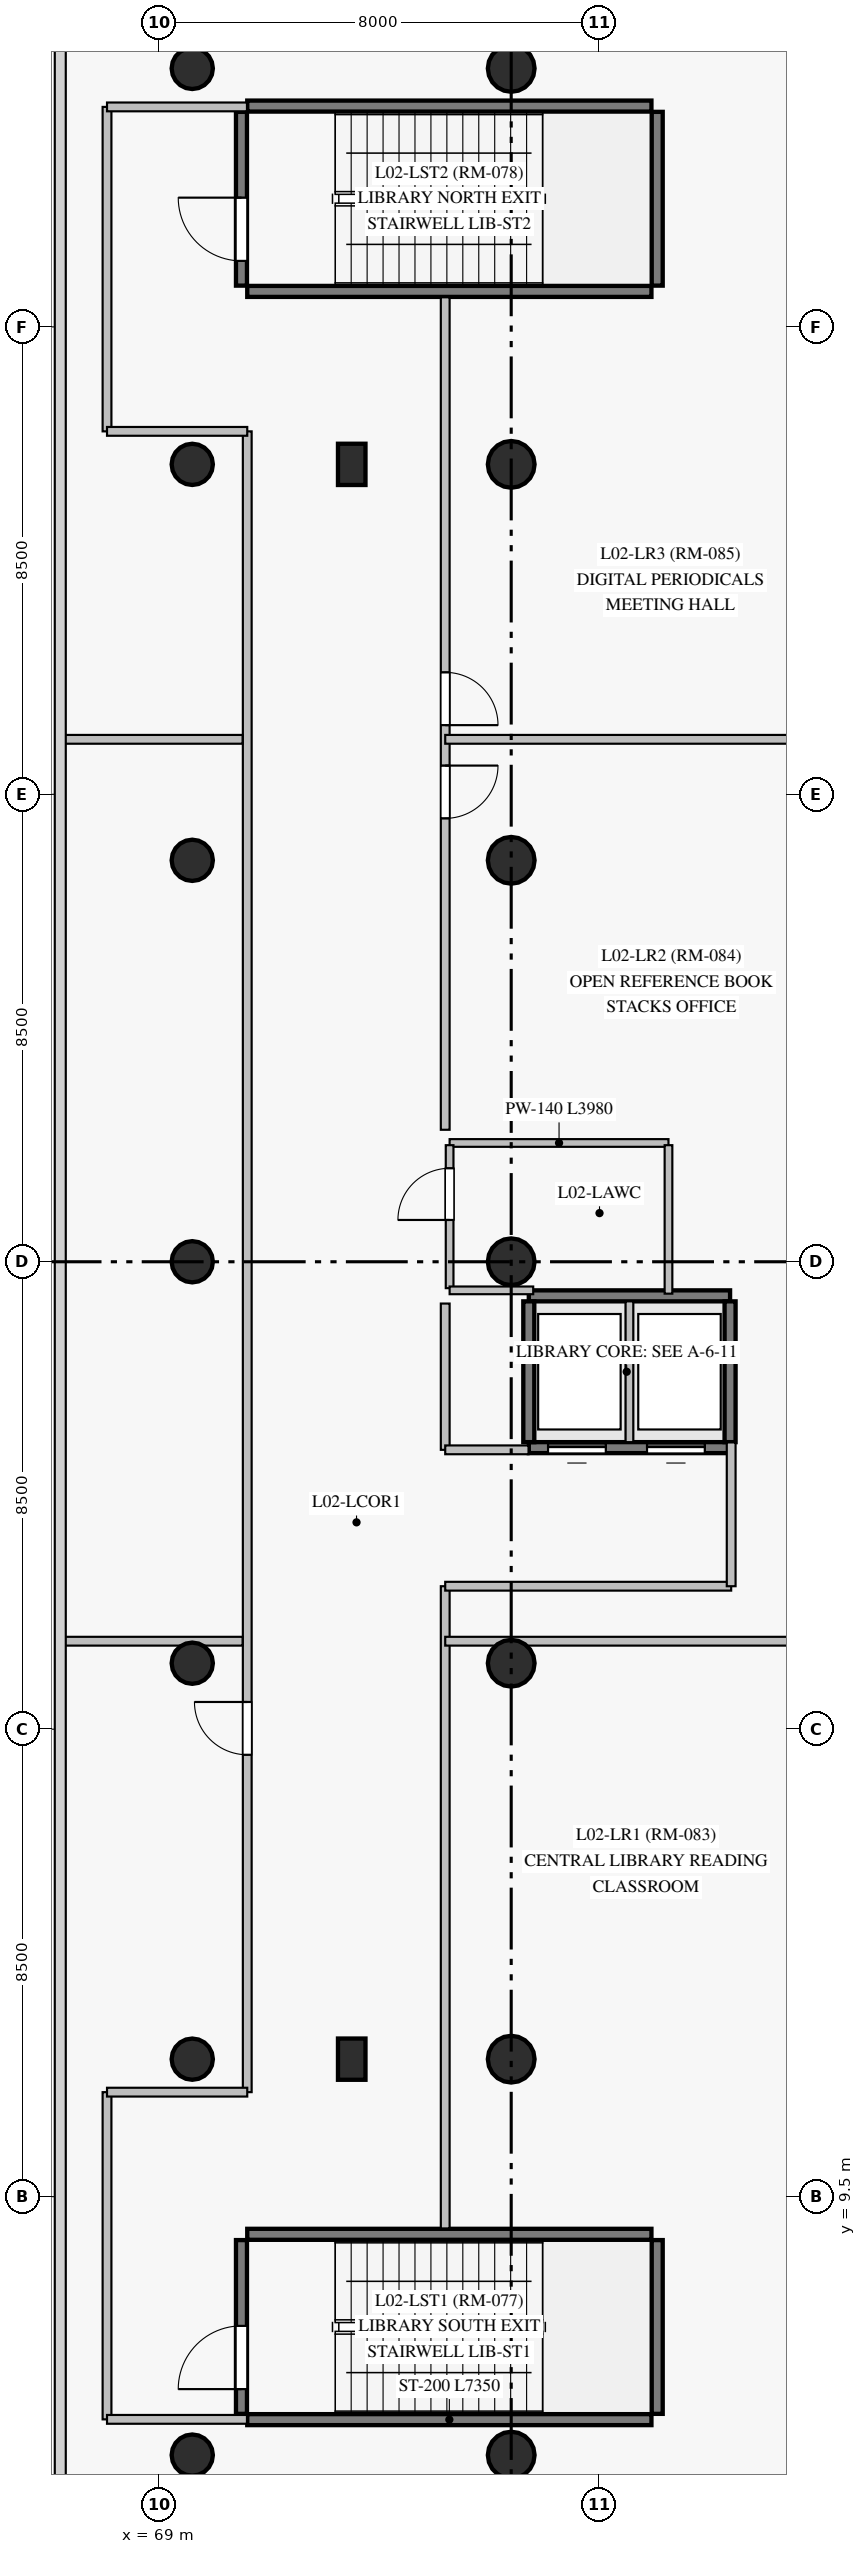
"""IFC4 building model, lengths in metres.
Left out: names, types, materials, properties, quantities, classifications, styles, units other than length and angle.
Written with IfcOpenShell. Run it as: python <this file> out.ifc"""

import sys

from ifc_helpers import new_model, si_unit, direction, frame, frame_2d, origin, origin_with_axes, origin_2d, place, context, subcontext, project, spatial, rectangle, circle, extrude, source, transform, mapped, element, fill, save


model = new_model("IFC4")
c1 = context("Model", 3, precision=1e-05, world=origin(), true_north=direction((0.0, 1.0)))
c2 = subcontext(c1, "Body", "Model", "MODEL_VIEW")
j1 = project(units=[si_unit("LENGTHUNIT", "METRE"), si_unit("PLANEANGLEUNIT", "RADIAN")], contexts=[c1])
p1 = place(None, origin())
s1 = spatial("IfcSite", under=j1, at=p1, CompositionType="ELEMENT")
p2 = place(p1, origin())
s2 = spatial("IfcBuilding", under=s1, at=p2, CompositionType="ELEMENT")
p3 = place(p2, frame((0.0, 0.0, 9.0)))
s3 = spatial("IfcBuildingStorey", under=s2, at=p3, CompositionType="ELEMENT", Elevation=9.0)
m1 = source(origin_with_axes(), c2, "Body", "SweptSolid", [
    extrude(circle(Radius=0.375, at=origin_2d()), origin(), (0.0, 0.0, 1.0), 4.5),
])
for number, where, z_axis, x_axis in (
    (1, (69.6, 4.8, 0.0), (0.0, 0.0, 1.0), (1.0, 0.0, 0.0)),
    (2, (69.6, 12.0, 0.0), (0.0, 0.0, 1.0), (1.0, 0.0, 0.0)),
    (3, (69.6, 19.2, 0.0), (0.0, 0.0, 1.0), (1.0, 0.0, 0.0)),
    (4, (69.6, 26.5, 0.0), (0.0, 0.0, 1.0), (1.0, 0.0, 0.0)),
    (5, (69.6, 33.8, 0.0), (0.0, 0.0, 1.0), (1.0, 0.0, 0.0)),
    (6, (69.6, 41.0, 0.0), (0.0, 0.0, 1.0), (1.0, 0.0, 0.0)),
    (7, (69.6, 48.2, 0.0), (0.0, 0.0, 1.0), (1.0, 0.0, 0.0)),
):
    element("IfcColumn", number, at=place(p3, frame(where, z_axis=z_axis, x_axis=x_axis)), inside=s3, PredefinedType="COLUMN", context=c2, shape_type="MappedRepresentation", body=[
        mapped(m1, transform((0.0, 0.0, 0.0), scale=1.0)),
    ])
m2 = source(origin_with_axes(), c2, "Body", "SweptSolid", [
    extrude(circle(Radius=0.425, at=origin_2d()), origin(), (0.0, 0.0, 1.0), 4.5),
])
for number, where, z_axis, x_axis in (
    (8, (75.4, 4.8, 0.0), (0.0, 0.0, 1.0), (1.0, 0.0, 0.0)),
    (9, (75.4, 12.0, 0.0), (0.0, 0.0, 1.0), (1.0, 0.0, 0.0)),
    (10, (75.4, 19.2, 0.0), (0.0, 0.0, 1.0), (1.0, 0.0, 0.0)),
    (11, (75.4, 26.5, 0.0), (0.0, 0.0, 1.0), (1.0, 0.0, 0.0)),
    (12, (75.4, 33.8, 0.0), (0.0, 0.0, 1.0), (1.0, 0.0, 0.0)),
    (13, (75.4, 41.0, 0.0), (0.0, 0.0, 1.0), (1.0, 0.0, 0.0)),
    (14, (75.4, 48.2, 0.0), (0.0, 0.0, 1.0), (1.0, 0.0, 0.0)),
):
    element("IfcColumn", number, at=place(p3, frame(where, z_axis=z_axis, x_axis=x_axis)), inside=s3, PredefinedType="COLUMN", context=c2, shape_type="MappedRepresentation", body=[
        mapped(m2, transform((0.0, 0.0, 0.0), scale=1.0)),
    ])
m3 = source(origin_with_axes(), c2, "Body", "SweptSolid", [
    extrude(rectangle(XDim=0.5, YDim=0.75, at=origin_2d()), origin(), (0.0, 0.0, 1.0), 4.5),
])
for number, where, z_axis, x_axis in (
    (15, (72.5, 12.0, 0.0), (0.0, 0.0, 1.0), (1.0, 0.0, 0.0)),
    (16, (72.5, 41.0, 0.0), (0.0, 0.0, 1.0), (1.0, 0.0, 0.0)),
):
    element("IfcColumn", number, at=place(p3, frame(where, z_axis=z_axis, x_axis=x_axis)), inside=s3, PredefinedType="PILASTER", context=c2, shape_type="MappedRepresentation", body=[
        mapped(m3, transform((0.0, 0.0, 0.0), scale=1.0)),
    ])
for number, where, z_axis, x_axis in (
    (17, (70.6, 5.445, 0.0), (0.0, 0.0, 1.0), (1.0, 0.0, 0.0)),
    (18, (70.6, 8.815, 0.0), (0.0, 0.0, 1.0), (1.0, 0.0, 0.0)),
    (19, (70.6, 44.145, 0.0), (0.0, 0.0, 1.0), (1.0, 0.0, 0.0)),
    (20, (70.6, 47.515, 0.0), (0.0, 0.0, 1.0), (1.0, 0.0, 0.0)),
):
    element("IfcWall", number, at=place(p3, frame(where, z_axis=z_axis, x_axis=x_axis)), inside=s3, PredefinedType="SHEAR", context=c2, shape_type="SweptSolid", body=[
        extrude(rectangle(XDim=7.35, YDim=0.2, at=frame_2d((3.675, 0.0))), origin(), (0.0, 0.0, 1.0), 4.2),
    ])
p4 = place(p3, frame((75.72, 23.12, 0.0), z_axis=(0.0, 0.0, 1.0), x_axis=(1.0, 0.0, 0.0)))
e21 = element("IfcWall", 21, at=p4, inside=s3, PredefinedType="SHEAR", context=c2, shape_type="SweptSolid", body=[
    extrude(rectangle(XDim=3.66, YDim=0.2, at=frame_2d((1.83, 0.0))), origin(), (0.0, 0.0, 1.0), 4.2),
])
p5 = place(p4, frame((0.35, 0.0, 0.0)))
e22 = element("IfcOpeningElement", 22, at=p5, cuts=e21, PredefinedType="OPENING", context=c2, shape_type="SweptSolid", body=[
    extrude(rectangle(XDim=1.05, YDim=2.15, at=frame_2d((0.525, 1.075))), frame((0.0, 0.11, 0.0), z_axis=(0.0, -1.0, 0.0), x_axis=(1.0, 0.0, 0.0)), (0.0, 0.0, 1.0), 0.22),
])
p6 = place(p4, frame((2.15, 0.0, 0.0)))
e23 = element("IfcOpeningElement", 23, at=p6, cuts=e21, PredefinedType="OPENING", context=c2, shape_type="SweptSolid", body=[
    extrude(rectangle(XDim=1.05, YDim=2.15, at=frame_2d((0.525, 1.075))), frame((0.0, 0.11, 0.0), z_axis=(0.0, -1.0, 0.0), x_axis=(1.0, 0.0, 0.0)), (0.0, 0.0, 1.0), 0.22),
])
p7 = place(p3, frame((75.72, 25.88, 0.0), z_axis=(0.0, 0.0, 1.0), x_axis=(1.0, 0.0, 0.0)))
e24 = element("IfcWall", 24, at=p7, inside=s3, PredefinedType="SHEAR", context=c2, shape_type="SweptSolid", body=[
    extrude(rectangle(XDim=3.66, YDim=0.2, at=frame_2d((1.83, 0.0))), origin(), (0.0, 0.0, 1.0), 4.2),
])
p8 = place(p3, frame((70.495, 5.55, 0.0), z_axis=(0.0, 0.0, 1.0), x_axis=(0.0, 1.0, 0.0)))
e25 = element("IfcWall", 25, at=p8, inside=s3, PredefinedType="SHEAR", context=c2, shape_type="SweptSolid", body=[
    extrude(rectangle(XDim=3.16, YDim=0.2, at=frame_2d((1.58, 0.0))), origin(), (0.0, 0.0, 1.0), 4.2),
])
p9 = place(p8, frame((0.45, 0.0, 0.0)))
e26 = element("IfcOpeningElement", 26, at=p9, cuts=e25, PredefinedType="OPENING", context=c2, shape_type="SweptSolid", body=[
    extrude(rectangle(XDim=1.15, YDim=2.15, at=frame_2d((0.575, 1.075))), frame((0.0, 0.11, 0.0), z_axis=(0.0, -1.0, 0.0), x_axis=(1.0, 0.0, 0.0)), (0.0, 0.0, 1.0), 0.22),
])
p10 = place(p3, frame((78.055, 5.55, 0.0), z_axis=(0.0, 0.0, 1.0), x_axis=(0.0, 1.0, 0.0)))
e27 = element("IfcWall", 27, at=p10, inside=s3, PredefinedType="SHEAR", context=c2, shape_type="SweptSolid", body=[
    extrude(rectangle(XDim=3.16, YDim=0.2, at=frame_2d((1.58, 0.0))), origin(), (0.0, 0.0, 1.0), 4.2),
])
p11 = place(p3, frame((70.495, 44.25, 0.0), z_axis=(0.0, 0.0, 1.0), x_axis=(0.0, 1.0, 0.0)))
e28 = element("IfcWall", 28, at=p11, inside=s3, PredefinedType="SHEAR", context=c2, shape_type="SweptSolid", body=[
    extrude(rectangle(XDim=3.16, YDim=0.2, at=frame_2d((1.58, 0.0))), origin(), (0.0, 0.0, 1.0), 4.2),
])
p12 = place(p11, frame((0.45, 0.0, 0.0)))
e29 = element("IfcOpeningElement", 29, at=p12, cuts=e28, PredefinedType="OPENING", context=c2, shape_type="SweptSolid", body=[
    extrude(rectangle(XDim=1.15, YDim=2.15, at=frame_2d((0.575, 1.075))), frame((0.0, 0.11, 0.0), z_axis=(0.0, -1.0, 0.0), x_axis=(1.0, 0.0, 0.0)), (0.0, 0.0, 1.0), 0.22),
])
p13 = place(p3, frame((78.055, 44.25, 0.0), z_axis=(0.0, 0.0, 1.0), x_axis=(0.0, 1.0, 0.0)))
e30 = element("IfcWall", 30, at=p13, inside=s3, PredefinedType="SHEAR", context=c2, shape_type="SweptSolid", body=[
    extrude(rectangle(XDim=3.16, YDim=0.2, at=frame_2d((1.58, 0.0))), origin(), (0.0, 0.0, 1.0), 4.2),
])
for number, where, z_axis, x_axis in (
    (31, (75.72, 23.22, 0.0), (0.0, 0.0, 1.0), (0.0, 1.0, 0.0)),
    (32, (79.38, 23.22, 0.0), (0.0, 0.0, 1.0), (0.0, 1.0, 0.0)),
):
    element("IfcWall", number, at=place(p3, frame(where, z_axis=z_axis, x_axis=x_axis)), inside=s3, PredefinedType="SHEAR", context=c2, shape_type="SweptSolid", body=[
        extrude(rectangle(XDim=2.56, YDim=0.2, at=frame_2d((1.28, 0.0))), origin(), (0.0, 0.0, 1.0), 4.2),
    ])
p14 = place(p3, frame((70.6, 11.4, 0.0), z_axis=(0.0, 0.0, 1.0), x_axis=(0.0, 1.0, 0.0)))
e33 = element("IfcWall", 33, at=p14, inside=s3, PredefinedType="PARTITIONING", context=c2, shape_type="SweptSolid", body=[
    extrude(rectangle(XDim=30.2, YDim=0.16, at=frame_2d((15.1, 0.0))), origin(), (0.0, 0.0, 1.0), 4.2),
])
p15 = place(p14, frame((6.135, 0.0, 0.0)))
e34 = element("IfcOpeningElement", 34, at=p15, cuts=e33, PredefinedType="OPENING", context=c2, shape_type="SweptSolid", body=[
    extrude(rectangle(XDim=0.96, YDim=2.15, at=frame_2d((0.48, 1.075))), frame((0.0, 0.09, 0.0), z_axis=(0.0, -1.0, 0.0), x_axis=(1.0, 0.0, 0.0)), (0.0, 0.0, 1.0), 0.18),
])
p16 = place(p3, frame((74.2, 44.038, 0.0), z_axis=(0.0, 0.0, 1.0), x_axis=(0.0, -1.0, 0.0)))
e35 = element("IfcWall", 35, at=p16, inside=s3, PredefinedType="PARTITIONING", context=c2, shape_type="SweptSolid", body=[
    extrude(rectangle(XDim=15.138, YDim=0.16, at=frame_2d((7.569, 0.0))), origin(), (0.0, 0.0, 1.0), 4.2),
])
p17 = place(p16, frame((8.515, 0.0, 0.0)))
e36 = element("IfcOpeningElement", 36, at=p17, cuts=e35, PredefinedType="OPENING", context=c2, shape_type="SweptSolid", body=[
    extrude(rectangle(XDim=0.96, YDim=2.15, at=frame_2d((0.48, 1.075))), frame((0.0, 0.09, 0.0), z_axis=(0.0, -1.0, 0.0), x_axis=(1.0, 0.0, 0.0)), (0.0, 0.0, 1.0), 0.18),
])
p18 = place(p16, frame((6.82, 0.0, 0.0)))
e37 = element("IfcOpeningElement", 37, at=p18, cuts=e35, PredefinedType="OPENING", context=c2, shape_type="SweptSolid", body=[
    extrude(rectangle(XDim=0.96, YDim=2.15, at=frame_2d((0.48, 1.075))), frame((0.0, 0.09, 0.0), z_axis=(0.0, -1.0, 0.0), x_axis=(1.0, 0.0, 0.0)), (0.0, 0.0, 1.0), 0.18),
])
p19 = place(p3, frame((74.2, 20.6, 0.0), z_axis=(0.0, 0.0, 1.0), x_axis=(0.0, -1.0, 0.0)))
e38 = element("IfcWall", 38, at=p19, inside=s3, PredefinedType="PARTITIONING", context=c2, shape_type="SweptSolid", body=[
    extrude(rectangle(XDim=11.678, YDim=0.16, at=frame_2d((5.839, 0.0))), origin(), (0.0, 0.0, 1.0), 4.2),
])
p20 = place(p3, frame((74.2, 19.6, 0.0), z_axis=(0.0, 0.0, 1.0), x_axis=(1.0, 0.0, 0.0)))
e39 = element("IfcWall", 39, at=p20, inside=s3, PredefinedType="PARTITIONING", context=c2, shape_type="SweptSolid", body=[
    extrude(rectangle(XDim=7.545, YDim=0.16, at=frame_2d((3.772, 0.0))), origin(), (0.0, 0.0, 1.0), 3.55),
])
p21 = place(p3, frame((74.2, 36.0, 0.0), z_axis=(0.0, 0.0, 1.0), x_axis=(1.0, 0.0, 0.0)))
e40 = element("IfcWall", 40, at=p21, inside=s3, PredefinedType="PARTITIONING", context=c2, shape_type="SweptSolid", body=[
    extrude(rectangle(XDim=7.545, YDim=0.16, at=frame_2d((3.772, 0.0))), origin(), (0.0, 0.0, 1.0), 4.2),
])
p22 = place(p3, frame((68.05, 5.45, 0.0), z_axis=(0.0, 0.0, 1.0), x_axis=(0.0, 1.0, 0.0)))
e41 = element("IfcWall", 41, at=p22, inside=s3, PredefinedType="PARTITIONING", context=c2, shape_type="SweptSolid", body=[
    extrude(rectangle(XDim=5.95, YDim=0.16, at=frame_2d((2.975, 0.0))), origin(), (0.0, 0.0, 1.0), 4.2),
])
p23 = place(p3, frame((68.05, 41.6, 0.0), z_axis=(0.0, 0.0, 1.0), x_axis=(0.0, 1.0, 0.0)))
e42 = element("IfcWall", 42, at=p23, inside=s3, PredefinedType="PARTITIONING", context=c2, shape_type="SweptSolid", body=[
    extrude(rectangle(XDim=5.9, YDim=0.16, at=frame_2d((2.95, 0.0))), origin(), (0.0, 0.0, 1.0), 4.2),
])
p24 = place(p3, frame((79.4, 20.6, 0.0), z_axis=(0.0, 0.0, 1.0), x_axis=(-1.0, 0.0, 0.0)))
e43 = element("IfcWall", 43, at=p24, inside=s3, PredefinedType="PARTITIONING", context=c2, shape_type="SweptSolid", body=[
    extrude(rectangle(XDim=5.2, YDim=0.16, at=frame_2d((2.6, 0.0))), origin(), (0.0, 0.0, 1.0), 4.2),
])
p25 = place(p3, frame((74.28, 28.66, 0.0), z_axis=(0.0, 0.0, 1.0), x_axis=(1.0, 0.0, 0.0)))
e44 = element("IfcWall", 44, at=p25, inside=s3, PredefinedType="PARTITIONING", context=c2, shape_type="SweptSolid", body=[
    extrude(rectangle(XDim=3.98, YDim=0.14, at=frame_2d((1.99, 0.0))), origin(), (0.0, 0.0, 1.0), 4.2),
])
p26 = place(p3, frame((67.255, 19.6, 0.0), z_axis=(0.0, 0.0, 1.0), x_axis=(1.0, 0.0, 0.0)))
e45 = element("IfcWall", 45, at=p26, inside=s3, PredefinedType="PARTITIONING", context=c2, shape_type="SweptSolid", body=[
    extrude(rectangle(XDim=3.26, YDim=0.16, at=frame_2d((1.63, 0.0))), origin(), (0.0, 0.0, 1.0), 3.55),
])
p27 = place(p3, frame((67.255, 36.0, 0.0), z_axis=(0.0, 0.0, 1.0), x_axis=(1.0, 0.0, 0.0)))
e46 = element("IfcWall", 46, at=p27, inside=s3, PredefinedType="PARTITIONING", context=c2, shape_type="SweptSolid", body=[
    extrude(rectangle(XDim=3.26, YDim=0.16, at=frame_2d((1.63, 0.0))), origin(), (0.0, 0.0, 1.0), 4.2),
])
p28 = place(p3, frame((78.26, 25.92, 0.0), z_axis=(0.0, 0.0, 1.0), x_axis=(0.0, 1.0, 0.0)))
e47 = element("IfcWall", 47, at=p28, inside=s3, PredefinedType="PARTITIONING", context=c2, shape_type="SweptSolid", body=[
    extrude(rectangle(XDim=2.7, YDim=0.14, at=frame_2d((1.35, 0.0))), origin(), (0.0, 0.0, 1.0), 4.2),
])
p29 = place(p3, frame((74.2, 25.74, 0.0), z_axis=(0.0, 0.0, 1.0), x_axis=(0.0, -1.0, 0.0)))
e48 = element("IfcWall", 48, at=p29, inside=s3, PredefinedType="PARTITIONING", context=c2, shape_type="SweptSolid", body=[
    extrude(rectangle(XDim=2.66, YDim=0.16, at=frame_2d((1.33, 0.0))), origin(), (0.0, 0.0, 1.0), 4.2),
])
p30 = place(p3, frame((74.28, 26.02, 0.0), z_axis=(0.0, 0.0, 1.0), x_axis=(0.0, 1.0, 0.0)))
e49 = element("IfcWall", 49, at=p30, inside=s3, PredefinedType="PARTITIONING", context=c2, shape_type="SweptSolid", body=[
    extrude(rectangle(XDim=2.6, YDim=0.14, at=frame_2d((1.3, 0.0))), origin(), (0.0, 0.0, 1.0), 4.2),
])
p31 = place(p30, frame((1.24, 0.0, 0.0)))
e50 = element("IfcOpeningElement", 50, at=p31, cuts=e49, PredefinedType="OPENING", context=c2, shape_type="SweptSolid", body=[
    extrude(rectangle(XDim=0.94, YDim=2.1, at=frame_2d((0.47, 1.05))), frame((0.0, 0.08, 0.0), z_axis=(0.0, -1.0, 0.0), x_axis=(1.0, 0.0, 0.0)), (0.0, 0.0, 1.0), 0.16),
])
p32 = place(p3, frame((77.55, 23.22, 0.0), z_axis=(0.0, 0.0, 1.0), x_axis=(0.0, 1.0, 0.0)))
e51 = element("IfcWall", 51, at=p32, inside=s3, PredefinedType="PARTITIONING", context=c2, shape_type="SweptSolid", body=[
    extrude(rectangle(XDim=2.56, YDim=0.14, at=frame_2d((1.28, 0.0))), origin(), (0.0, 0.0, 1.0), 4.2),
])
for number, where, z_axis, x_axis in (
    (52, (70.6, 41.6, 0.0), (0.0, 0.0, 1.0), (-1.0, 0.0, 0.0)),
    (53, (68.05, 11.4, 0.0), (0.0, 0.0, 1.0), (1.0, 0.0, 0.0)),
):
    element("IfcWall", number, at=place(p3, frame(where, z_axis=z_axis, x_axis=x_axis)), inside=s3, PredefinedType="PARTITIONING", context=c2, shape_type="SweptSolid", body=[
        extrude(rectangle(XDim=2.55, YDim=0.16, at=frame_2d((1.275, 0.0))), origin(), (0.0, 0.0, 1.0), 3.55),
    ])
p33 = place(p3, frame((79.4, 23.215, 0.0), z_axis=(0.0, 0.0, 1.0), x_axis=(0.0, -1.0, 0.0)))
e54 = element("IfcWall", 54, at=p33, inside=s3, PredefinedType="PARTITIONING", context=c2, shape_type="SweptSolid", body=[
    extrude(rectangle(XDim=2.615, YDim=0.16, at=frame_2d((1.308, 0.0))), origin(), (0.0, 0.0, 1.0), 4.2),
])
p34 = place(p3, frame((68.05, 47.5, 0.0), z_axis=(0.0, 0.0, 1.0), x_axis=(1.0, 0.0, 0.0)))
e55 = element("IfcWall", 55, at=p34, inside=s3, PredefinedType="PARTITIONING", context=c2, shape_type="SweptSolid", body=[
    extrude(rectangle(XDim=2.545, YDim=0.16, at=frame_2d((1.272, 0.0))), origin(), (0.0, 0.0, 1.0), 4.2),
])
p35 = place(p3, frame((70.595, 5.45, 0.0), z_axis=(0.0, 0.0, 1.0), x_axis=(-1.0, 0.0, 0.0)))
e56 = element("IfcWall", 56, at=p35, inside=s3, PredefinedType="PARTITIONING", context=c2, shape_type="SweptSolid", body=[
    extrude(rectangle(XDim=2.545, YDim=0.16, at=frame_2d((1.272, 0.0))), origin(), (0.0, 0.0, 1.0), 3.55),
])
p36 = place(p3, frame((74.28, 25.98, 0.0), z_axis=(0.0, 0.0, 1.0), x_axis=(1.0, 0.0, 0.0)))
e57 = element("IfcWall", 57, at=p36, inside=s3, PredefinedType="PARTITIONING", context=c2, shape_type="SweptSolid", body=[
    extrude(rectangle(XDim=1.52, YDim=0.14, at=frame_2d((0.76, 0.0))), origin(), (0.0, 0.0, 1.0), 3.55),
])
p37 = place(p3, frame((74.2, 23.08, 0.0), z_axis=(0.0, 0.0, 1.0), x_axis=(1.0, 0.0, 0.0)))
e58 = element("IfcWall", 58, at=p37, inside=s3, PredefinedType="PARTITIONING", context=c2, shape_type="SweptSolid", body=[
    extrude(rectangle(XDim=1.515, YDim=0.16, at=frame_2d((0.758, 0.0))), origin(), (0.0, 0.0, 1.0), 3.7),
])
m4 = source(origin_with_axes(), c2, "Body", "SweptSolid", [
    extrude(rectangle(XDim=1.15, YDim=2.15, at=frame_2d((0.575, 1.075))), frame((0.0, 0.025, 0.0), z_axis=(0.0, -1.0, 0.0), x_axis=(1.0, 0.0, 0.0)), (0.0, 0.0, 1.0), 0.05),
])
p38 = place(p9, origin())
e59 = element("IfcDoor", 59, at=p38, inside=s3, OperationType="SINGLE_SWING_LEFT", PredefinedType="DOOR", context=c2, shape_type="MappedRepresentation", body=[
    mapped(m4, transform((0.0, 0.0, 0.0), scale=1.0)),
])
fill(e26, e59)
p39 = place(p12, origin())
e60 = element("IfcDoor", 60, at=p39, inside=s3, OperationType="SINGLE_SWING_RIGHT", PredefinedType="DOOR", context=c2, shape_type="MappedRepresentation", body=[
    mapped(m4, transform((0.0, 0.0, 0.0), scale=1.0)),
])
fill(e29, e60)
m5 = source(origin_with_axes(), c2, "Body", "SweptSolid", [
    extrude(rectangle(XDim=1.05, YDim=2.15, at=frame_2d((0.525, 1.075))), frame((0.0, 0.025, 0.0), z_axis=(0.0, -1.0, 0.0), x_axis=(1.0, 0.0, 0.0)), (0.0, 0.0, 1.0), 0.05),
])
p40 = place(p5, origin())
e61 = element("IfcDoor", 61, at=p40, inside=s3, OperationType="SLIDING_TO_LEFT", PredefinedType="DOOR", context=c2, shape_type="MappedRepresentation", body=[
    mapped(m5, transform((0.0, 0.0, 0.0), scale=1.0)),
])
fill(e22, e61)
p41 = place(p6, origin())
e62 = element("IfcDoor", 62, at=p41, inside=s3, OperationType="SLIDING_TO_RIGHT", PredefinedType="DOOR", context=c2, shape_type="MappedRepresentation", body=[
    mapped(m5, transform((0.0, 0.0, 0.0), scale=1.0)),
])
fill(e23, e62)
m6 = source(origin_with_axes(), c2, "Body", "SweptSolid", [
    extrude(rectangle(XDim=0.94, YDim=2.1, at=frame_2d((0.47, 1.05))), frame((0.0, 0.025, 0.0), z_axis=(0.0, -1.0, 0.0), x_axis=(1.0, 0.0, 0.0)), (0.0, 0.0, 1.0), 0.05),
])
p42 = place(p31, origin())
e63 = element("IfcDoor", 63, at=p42, inside=s3, OperationType="SINGLE_SWING_LEFT", PredefinedType="DOOR", context=c2, shape_type="MappedRepresentation", body=[
    mapped(m6, transform((0.0, 0.0, 0.0), scale=1.0)),
])
fill(e50, e63)
m7 = source(origin_with_axes(), c2, "Body", "SweptSolid", [
    extrude(rectangle(XDim=0.96, YDim=2.15, at=frame_2d((0.48, 1.075))), frame((0.0, 0.025, 0.0), z_axis=(0.0, -1.0, 0.0), x_axis=(1.0, 0.0, 0.0)), (0.0, 0.0, 1.0), 0.05),
])
p43 = place(p15, origin())
e64 = element("IfcDoor", 64, at=p43, inside=s3, OperationType="SINGLE_SWING_RIGHT", PredefinedType="DOOR", context=c2, shape_type="MappedRepresentation", body=[
    mapped(m7, transform((0.0, 0.0, 0.0), scale=1.0)),
])
fill(e34, e64)
p44 = place(p17, origin())
e65 = element("IfcDoor", 65, at=p44, inside=s3, OperationType="SINGLE_SWING_LEFT", PredefinedType="DOOR", context=c2, shape_type="MappedRepresentation", body=[
    mapped(m7, transform((0.0, 0.0, 0.0), scale=1.0)),
])
fill(e36, e65)
p45 = place(p18, origin())
e66 = element("IfcDoor", 66, at=p45, inside=s3, OperationType="SINGLE_SWING_RIGHT", PredefinedType="DOOR", context=c2, shape_type="MappedRepresentation", body=[
    mapped(m7, transform((0.0, 0.0, 0.0), scale=1.0)),
])
fill(e37, e66)
save(model, sys.argv[1])
